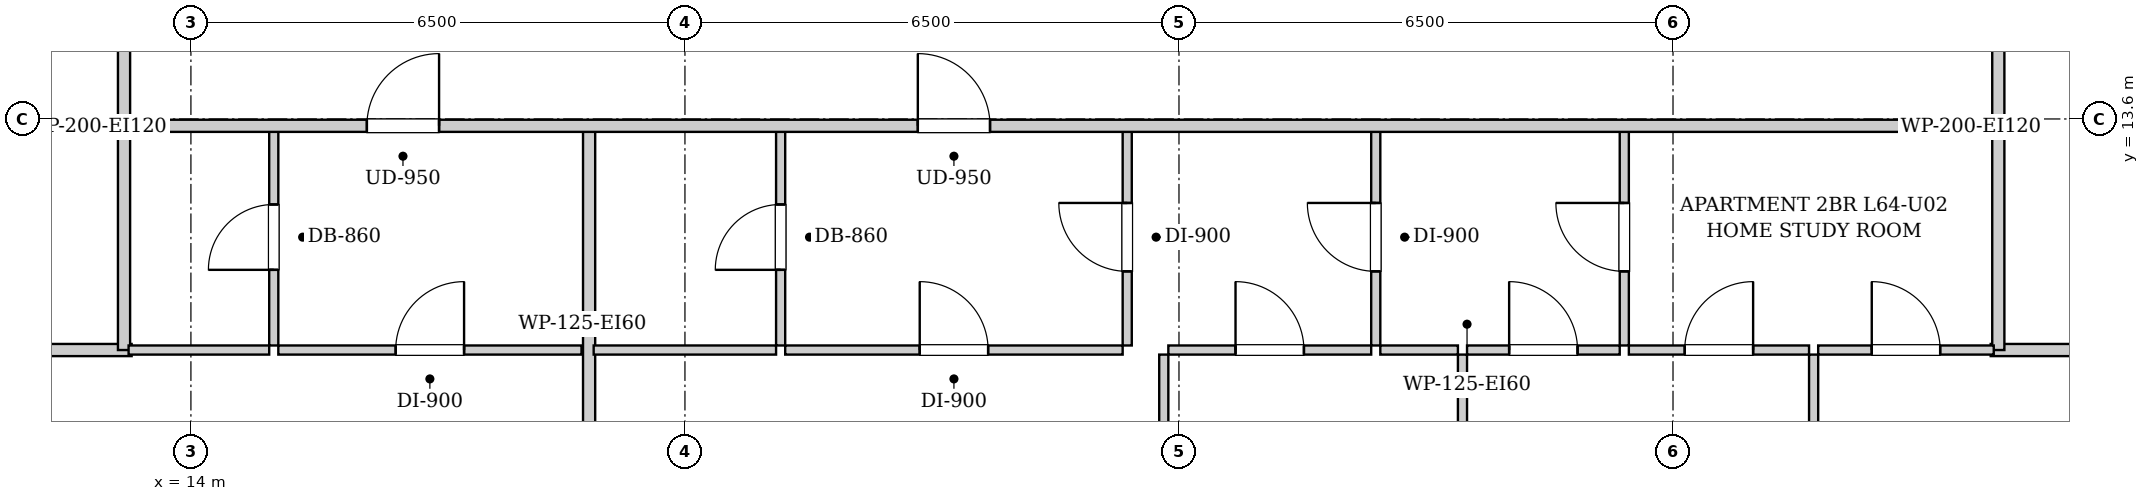
"""IFC4 building model, lengths in metres.
Left out: names, types, materials, properties, quantities, classifications, styles, units other than length and angle.
Written with IfcOpenShell. Run it as: python <this file> out.ifc"""

import sys

from ifc_helpers import new_model, si_unit, direction, frame, frame_2d, origin, place, context, subcontext, project, spatial, rectangle, extrude, element, fill, save


model = new_model("IFC4")
c1 = context("Model", 3, precision=1e-05, world=origin(), true_north=direction((0.0, 1.0)))
c2 = subcontext(c1, "Body", "Model", "MODEL_VIEW")
j1 = project(units=[si_unit("LENGTHUNIT", "METRE"), si_unit("PLANEANGLEUNIT", "RADIAN")], contexts=[c1])
p1 = place(None, origin())
s1 = spatial("IfcSite", under=j1, at=p1, CompositionType="ELEMENT")
p2 = place(p1, origin())
s2 = spatial("IfcBuilding", under=s1, at=p2, CompositionType="ELEMENT")
p3 = place(p2, frame((0.0, 0.0, 220.7)))
s3 = spatial("IfcBuildingStorey", under=s2, at=p3, CompositionType="ELEMENT", Elevation=220.7)
for number, where, z_axis, x_axis in (
    (1, (13.12, 13.51, 0.0), (0.0, 0.0, 1.0), (0.0, 1.0, 0.0)),
    (2, (37.78, 13.51, 0.0), (0.0, 0.0, 1.0), (0.0, 1.0, 0.0)),
):
    element("IfcWall", number, at=place(p3, frame(where, z_axis=z_axis, x_axis=x_axis)), inside=s3, PredefinedType="PARTITIONING", context=c2, shape_type="SweptSolid", body=[
        extrude(rectangle(XDim=1.58, YDim=0.16, at=frame_2d((0.79, 0.0))), origin(), (0.0, 0.0, 1.0), 3.14),
    ])
p4 = place(p3, frame((10.88, 10.56, 0.0), z_axis=(0.0, 0.0, 1.0), x_axis=(1.0, 0.0, 0.0)))
e3 = element("IfcWall", 3, at=p4, inside=s3, PredefinedType="PARTITIONING", context=c2, shape_type="SweptSolid", body=[
    extrude(rectangle(XDim=2.34, YDim=0.16, at=frame_2d((1.17, 0.0))), origin(), (0.0, 0.0, 1.0), 3.14),
])
p5 = place(p3, frame((13.12, 10.56, 0.0), z_axis=(0.0, 0.0, 1.0), x_axis=(0.0, 1.0, 0.0)))
e4 = element("IfcWall", 4, at=p5, inside=s3, PredefinedType="PARTITIONING", context=c2, shape_type="SweptSolid", body=[
    extrude(rectangle(XDim=2.91, YDim=0.16, at=frame_2d((1.455, 0.0))), origin(), (0.0, 0.0, 1.0), 3.14),
])
p6 = place(p3, frame((15.09, 10.62, 0.0), z_axis=(0.0, 0.0, 1.0), x_axis=(0.0, 1.0, 0.0)))
e5 = element("IfcWall", 5, at=p6, inside=s3, PredefinedType="PARTITIONING", context=c2, shape_type="SweptSolid", body=[
    extrude(rectangle(XDim=2.85, YDim=0.12, at=frame_2d((1.425, 0.0))), origin(), (0.0, 0.0, 1.0), 3.14),
])
p7 = place(p6, frame((0.995, 0.0, 0.0)))
e6 = element("IfcOpeningElement", 6, at=p7, cuts=e5, PredefinedType="OPENING", context=c2, shape_type="SweptSolid", body=[
    extrude(rectangle(XDim=0.86, YDim=2.05, at=frame_2d((0.43, 1.025))), frame((0.0, 0.07, 0.0), z_axis=(0.0, -1.0, 0.0), x_axis=(1.0, 0.0, 0.0)), (0.0, 0.0, 1.0), 0.14),
])
p8 = place(p3, frame((13.18, 10.56, 0.0), z_axis=(0.0, 0.0, 1.0), x_axis=(1.0, 0.0, 0.0)))
e7 = element("IfcWall", 7, at=p8, inside=s3, PredefinedType="PARTITIONING", context=c2, shape_type="SweptSolid", body=[
    extrude(rectangle(XDim=1.85, YDim=0.12, at=frame_2d((0.925, 0.0))), origin(), (0.0, 0.0, 1.0), 3.14),
])
p9 = place(p3, frame((15.15, 10.56, 0.0), z_axis=(0.0, 0.0, 1.0), x_axis=(1.0, 0.0, 0.0)))
e8 = element("IfcWall", 8, at=p9, inside=s3, PredefinedType="PARTITIONING", context=c2, shape_type="SweptSolid", body=[
    extrude(rectangle(XDim=3.989, YDim=0.12, at=frame_2d((1.995, 0.0))), origin(), (0.0, 0.0, 1.0), 3.14),
])
p10 = place(p9, frame((1.544, 0.0, 0.0)))
e9 = element("IfcOpeningElement", 9, at=p10, cuts=e8, PredefinedType="OPENING", context=c2, shape_type="SweptSolid", body=[
    extrude(rectangle(XDim=0.9, YDim=2.05, at=frame_2d((0.45, 1.025))), frame((0.0, 0.07, 0.0), z_axis=(0.0, -1.0, 0.0), x_axis=(1.0, 0.0, 0.0)), (0.0, 0.0, 1.0), 0.14),
])
p11 = place(p3, frame((37.68, 10.56, 0.0), z_axis=(0.0, 0.0, 1.0), x_axis=(1.0, 0.0, 0.0)))
e10 = element("IfcWall", 10, at=p11, inside=s3, PredefinedType="PARTITIONING", context=c2, shape_type="SweptSolid", body=[
    extrude(rectangle(XDim=2.34, YDim=0.16, at=frame_2d((1.17, 0.0))), origin(), (0.0, 0.0, 1.0), 3.14),
])
p12 = place(p3, frame((37.78, 10.56, 0.0), z_axis=(0.0, 0.0, 1.0), x_axis=(0.0, 1.0, 0.0)))
e11 = element("IfcWall", 11, at=p12, inside=s3, PredefinedType="PARTITIONING", context=c2, shape_type="SweptSolid", body=[
    extrude(rectangle(XDim=2.91, YDim=0.16, at=frame_2d((1.455, 0.0))), origin(), (0.0, 0.0, 1.0), 3.14),
])
p13 = place(p3, frame((19.239, 6.06, 0.0), z_axis=(0.0, 0.0, 1.0), x_axis=(0.0, 1.0, 0.0)))
e12 = element("IfcWall", 12, at=p13, inside=s3, PredefinedType="PARTITIONING", context=c2, shape_type="SweptSolid", body=[
    extrude(rectangle(XDim=7.41, YDim=0.16, at=frame_2d((3.705, 0.0))), origin(), (0.0, 0.0, 1.0), 3.14),
])
p14 = place(p3, frame((21.759, 10.62, 0.0), z_axis=(0.0, 0.0, 1.0), x_axis=(0.0, 1.0, 0.0)))
e13 = element("IfcWall", 13, at=p14, inside=s3, PredefinedType="PARTITIONING", context=c2, shape_type="SweptSolid", body=[
    extrude(rectangle(XDim=2.85, YDim=0.12, at=frame_2d((1.425, 0.0))), origin(), (0.0, 0.0, 1.0), 3.14),
])
p15 = place(p14, frame((0.995, 0.0, 0.0)))
e14 = element("IfcOpeningElement", 14, at=p15, cuts=e13, PredefinedType="OPENING", context=c2, shape_type="SweptSolid", body=[
    extrude(rectangle(XDim=0.86, YDim=2.05, at=frame_2d((0.43, 1.025))), frame((0.0, 0.07, 0.0), z_axis=(0.0, -1.0, 0.0), x_axis=(1.0, 0.0, 0.0)), (0.0, 0.0, 1.0), 0.14),
])
p16 = place(p3, frame((19.299, 10.56, 0.0), z_axis=(0.0, 0.0, 1.0), x_axis=(1.0, 0.0, 0.0)))
e15 = element("IfcWall", 15, at=p16, inside=s3, PredefinedType="PARTITIONING", context=c2, shape_type="SweptSolid", body=[
    extrude(rectangle(XDim=2.4, YDim=0.12, at=frame_2d((1.2, 0.0))), origin(), (0.0, 0.0, 1.0), 3.14),
])
p17 = place(p3, frame((26.319, 10.62, 0.0), z_axis=(0.0, 0.0, 1.0), x_axis=(0.0, 1.0, 0.0)))
e16 = element("IfcWall", 16, at=p17, inside=s3, PredefinedType="PARTITIONING", context=c2, shape_type="SweptSolid", body=[
    extrude(rectangle(XDim=2.85, YDim=0.12, at=frame_2d((1.425, 0.0))), origin(), (0.0, 0.0, 1.0), 3.14),
])
p18 = place(p17, frame((0.975, 0.0, 0.0)))
e17 = element("IfcOpeningElement", 17, at=p18, cuts=e16, PredefinedType="OPENING", context=c2, shape_type="SweptSolid", body=[
    extrude(rectangle(XDim=0.9, YDim=2.05, at=frame_2d((0.45, 1.025))), frame((0.0, 0.07, 0.0), z_axis=(0.0, -1.0, 0.0), x_axis=(1.0, 0.0, 0.0)), (0.0, 0.0, 1.0), 0.14),
])
p19 = place(p3, frame((21.819, 10.56, 0.0), z_axis=(0.0, 0.0, 1.0), x_axis=(1.0, 0.0, 0.0)))
e18 = element("IfcWall", 18, at=p19, inside=s3, PredefinedType="PARTITIONING", context=c2, shape_type="SweptSolid", body=[
    extrude(rectangle(XDim=4.44, YDim=0.12, at=frame_2d((2.22, 0.0))), origin(), (0.0, 0.0, 1.0), 3.14),
])
p20 = place(p19, frame((1.77, 0.0, 0.0)))
e19 = element("IfcOpeningElement", 19, at=p20, cuts=e18, PredefinedType="OPENING", context=c2, shape_type="SweptSolid", body=[
    extrude(rectangle(XDim=0.9, YDim=2.05, at=frame_2d((0.45, 1.025))), frame((0.0, 0.07, 0.0), z_axis=(0.0, -1.0, 0.0), x_axis=(1.0, 0.0, 0.0)), (0.0, 0.0, 1.0), 0.14),
])
p21 = place(p3, frame((29.589, 10.62, 0.0), z_axis=(0.0, 0.0, 1.0), x_axis=(0.0, 1.0, 0.0)))
e20 = element("IfcWall", 20, at=p21, inside=s3, PredefinedType="PARTITIONING", context=c2, shape_type="SweptSolid", body=[
    extrude(rectangle(XDim=2.85, YDim=0.12, at=frame_2d((1.425, 0.0))), origin(), (0.0, 0.0, 1.0), 3.14),
])
p22 = place(p21, frame((0.975, 0.0, 0.0)))
e21 = element("IfcOpeningElement", 21, at=p22, cuts=e20, PredefinedType="OPENING", context=c2, shape_type="SweptSolid", body=[
    extrude(rectangle(XDim=0.9, YDim=2.05, at=frame_2d((0.45, 1.025))), frame((0.0, 0.07, 0.0), z_axis=(0.0, -1.0, 0.0), x_axis=(1.0, 0.0, 0.0)), (0.0, 0.0, 1.0), 0.14),
])
p23 = place(p3, frame((26.86, 10.56, 0.0), z_axis=(0.0, 0.0, 1.0), x_axis=(1.0, 0.0, 0.0)))
e22 = element("IfcWall", 22, at=p23, inside=s3, PredefinedType="PARTITIONING", context=c2, shape_type="SweptSolid", body=[
    extrude(rectangle(XDim=2.669, YDim=0.12, at=frame_2d((1.334, 0.0))), origin(), (0.0, 0.0, 1.0), 3.14),
])
p24 = place(p23, frame((0.884, 0.0, 0.0)))
e23 = element("IfcOpeningElement", 23, at=p24, cuts=e22, PredefinedType="OPENING", context=c2, shape_type="SweptSolid", body=[
    extrude(rectangle(XDim=0.9, YDim=2.05, at=frame_2d((0.45, 1.025))), frame((0.0, 0.07, 0.0), z_axis=(0.0, -1.0, 0.0), x_axis=(1.0, 0.0, 0.0)), (0.0, 0.0, 1.0), 0.14),
])
p25 = place(p3, frame((32.859, 10.62, 0.0), z_axis=(0.0, 0.0, 1.0), x_axis=(0.0, 1.0, 0.0)))
e24 = element("IfcWall", 24, at=p25, inside=s3, PredefinedType="PARTITIONING", context=c2, shape_type="SweptSolid", body=[
    extrude(rectangle(XDim=2.85, YDim=0.12, at=frame_2d((1.425, 0.0))), origin(), (0.0, 0.0, 1.0), 3.14),
])
p26 = place(p25, frame((0.975, 0.0, 0.0)))
e25 = element("IfcOpeningElement", 25, at=p26, cuts=e24, PredefinedType="OPENING", context=c2, shape_type="SweptSolid", body=[
    extrude(rectangle(XDim=0.9, YDim=2.05, at=frame_2d((0.45, 1.025))), frame((0.0, 0.07, 0.0), z_axis=(0.0, -1.0, 0.0), x_axis=(1.0, 0.0, 0.0)), (0.0, 0.0, 1.0), 0.14),
])
p27 = place(p3, frame((29.649, 10.56, 0.0), z_axis=(0.0, 0.0, 1.0), x_axis=(1.0, 0.0, 0.0)))
e26 = element("IfcWall", 26, at=p27, inside=s3, PredefinedType="PARTITIONING", context=c2, shape_type="SweptSolid", body=[
    extrude(rectangle(XDim=1.021, YDim=0.12, at=frame_2d((0.51, 0.0))), origin(), (0.0, 0.0, 1.0), 3.14),
])
p28 = place(p3, frame((30.79, 10.56, 0.0), z_axis=(0.0, 0.0, 1.0), x_axis=(1.0, 0.0, 0.0)))
e27 = element("IfcWall", 27, at=p28, inside=s3, PredefinedType="PARTITIONING", context=c2, shape_type="SweptSolid", body=[
    extrude(rectangle(XDim=2.009, YDim=0.12, at=frame_2d((1.004, 0.0))), origin(), (0.0, 0.0, 1.0), 3.14),
])
p29 = place(p28, frame((0.554, 0.0, 0.0)))
e28 = element("IfcOpeningElement", 28, at=p29, cuts=e27, PredefinedType="OPENING", context=c2, shape_type="SweptSolid", body=[
    extrude(rectangle(XDim=0.9, YDim=2.05, at=frame_2d((0.45, 1.025))), frame((0.0, 0.07, 0.0), z_axis=(0.0, -1.0, 0.0), x_axis=(1.0, 0.0, 0.0)), (0.0, 0.0, 1.0), 0.14),
])
p30 = place(p3, frame((32.919, 10.56, 0.0), z_axis=(0.0, 0.0, 1.0), x_axis=(1.0, 0.0, 0.0)))
e29 = element("IfcWall", 29, at=p30, inside=s3, PredefinedType="PARTITIONING", context=c2, shape_type="SweptSolid", body=[
    extrude(rectangle(XDim=2.371, YDim=0.12, at=frame_2d((1.186, 0.0))), origin(), (0.0, 0.0, 1.0), 3.14),
])
p31 = place(p30, frame((0.735, 0.0, 0.0)))
e30 = element("IfcOpeningElement", 30, at=p31, cuts=e29, PredefinedType="OPENING", context=c2, shape_type="SweptSolid", body=[
    extrude(rectangle(XDim=0.9, YDim=2.05, at=frame_2d((0.45, 1.025))), frame((0.0, 0.07, 0.0), z_axis=(0.0, -1.0, 0.0), x_axis=(1.0, 0.0, 0.0)), (0.0, 0.0, 1.0), 0.14),
])
p32 = place(p3, frame((35.41, 10.56, 0.0), z_axis=(0.0, 0.0, 1.0), x_axis=(1.0, 0.0, 0.0)))
e31 = element("IfcWall", 31, at=p32, inside=s3, PredefinedType="PARTITIONING", context=c2, shape_type="SweptSolid", body=[
    extrude(rectangle(XDim=2.31, YDim=0.12, at=frame_2d((1.155, 0.0))), origin(), (0.0, 0.0, 1.0), 3.14),
])
p33 = place(p32, frame((0.705, 0.0, 0.0)))
e32 = element("IfcOpeningElement", 32, at=p33, cuts=e31, PredefinedType="OPENING", context=c2, shape_type="SweptSolid", body=[
    extrude(rectangle(XDim=0.9, YDim=2.05, at=frame_2d((0.45, 1.025))), frame((0.0, 0.07, 0.0), z_axis=(0.0, -1.0, 0.0), x_axis=(1.0, 0.0, 0.0)), (0.0, 0.0, 1.0), 0.14),
])
p34 = place(p3, frame((26.8, 4.08, 0.0), z_axis=(0.0, 0.0, 1.0), x_axis=(0.0, 1.0, 0.0)))
e33 = element("IfcWall", 33, at=p34, inside=s3, PredefinedType="PARTITIONING", context=c2, shape_type="SweptSolid", body=[
    extrude(rectangle(XDim=6.42, YDim=0.12, at=frame_2d((3.21, 0.0))), origin(), (0.0, 0.0, 1.0), 3.14),
])
p35 = place(p34, frame((2.745, 0.0, 0.0)))
e34 = element("IfcOpeningElement", 34, at=p35, cuts=e33, PredefinedType="OPENING", context=c2, shape_type="SweptSolid", body=[
    extrude(rectangle(XDim=0.9, YDim=2.05, at=frame_2d((0.45, 1.025))), frame((0.0, 0.07, 0.0), z_axis=(0.0, -1.0, 0.0), x_axis=(1.0, 0.0, 0.0)), (0.0, 0.0, 1.0), 0.14),
])
p36 = place(p3, frame((30.73, 4.08, 0.0), z_axis=(0.0, 0.0, 1.0), x_axis=(0.0, 1.0, 0.0)))
e35 = element("IfcWall", 35, at=p36, inside=s3, PredefinedType="PARTITIONING", context=c2, shape_type="SweptSolid", body=[
    extrude(rectangle(XDim=6.42, YDim=0.12, at=frame_2d((3.21, 0.0))), origin(), (0.0, 0.0, 1.0), 3.14),
])
p37 = place(p36, frame((2.745, 0.0, 0.0)))
e36 = element("IfcOpeningElement", 36, at=p37, cuts=e35, PredefinedType="OPENING", context=c2, shape_type="SweptSolid", body=[
    extrude(rectangle(XDim=0.9, YDim=2.05, at=frame_2d((0.45, 1.025))), frame((0.0, 0.07, 0.0), z_axis=(0.0, -1.0, 0.0), x_axis=(1.0, 0.0, 0.0)), (0.0, 0.0, 1.0), 0.14),
])
p38 = place(p3, frame((35.35, 4.08, 0.0), z_axis=(0.0, 0.0, 1.0), x_axis=(0.0, 1.0, 0.0)))
e37 = element("IfcWall", 37, at=p38, inside=s3, PredefinedType="PARTITIONING", context=c2, shape_type="SweptSolid", body=[
    extrude(rectangle(XDim=6.42, YDim=0.12, at=frame_2d((3.21, 0.0))), origin(), (0.0, 0.0, 1.0), 3.14),
])
p39 = place(p38, frame((2.745, 0.0, 0.0)))
e38 = element("IfcOpeningElement", 38, at=p39, cuts=e37, PredefinedType="OPENING", context=c2, shape_type="SweptSolid", body=[
    extrude(rectangle(XDim=0.9, YDim=2.05, at=frame_2d((0.45, 1.025))), frame((0.0, 0.07, 0.0), z_axis=(0.0, -1.0, 0.0), x_axis=(1.0, 0.0, 0.0)), (0.0, 0.0, 1.0), 0.14),
])
p40 = place(p3, frame((13.15, 13.51, 0.0), z_axis=(0.0, 0.0, 1.0), x_axis=(1.0, 0.0, 0.0)))
e39 = element("IfcWall", 39, at=p40, inside=s3, PredefinedType="PARTITIONING", context=c2, shape_type="SweptSolid", body=[
    extrude(rectangle(XDim=24.6, YDim=0.16, at=frame_2d((12.3, 0.0))), origin(), (0.0, 0.0, 1.0), 3.14),
])
p41 = place(p40, frame((3.165, 0.0, 0.0)))
e40 = element("IfcOpeningElement", 40, at=p41, cuts=e39, PredefinedType="OPENING", context=c2, shape_type="SweptSolid", body=[
    extrude(rectangle(XDim=0.95, YDim=2.1, at=frame_2d((0.475, 1.05))), frame((0.0, 0.09, 0.0), z_axis=(0.0, -1.0, 0.0), x_axis=(1.0, 0.0, 0.0)), (0.0, 0.0, 1.0), 0.18),
])
p42 = place(p40, frame((10.414, 0.0, 0.0)))
e41 = element("IfcOpeningElement", 41, at=p42, cuts=e39, PredefinedType="OPENING", context=c2, shape_type="SweptSolid", body=[
    extrude(rectangle(XDim=0.95, YDim=2.1, at=frame_2d((0.475, 1.05))), frame((0.0, 0.09, 0.0), z_axis=(0.0, -1.0, 0.0), x_axis=(1.0, 0.0, 0.0)), (0.0, 0.0, 1.0), 0.18),
])
p43 = place(p7, origin())
e42 = element("IfcDoor", 42, at=p43, inside=s3, OperationType="SINGLE_SWING_LEFT", PredefinedType="DOOR", context=c2, shape_type="SweptSolid", body=[
    extrude(rectangle(XDim=0.86, YDim=2.05, at=frame_2d((0.43, 1.025))), frame((0.0, 0.025, 0.0), z_axis=(0.0, -1.0, 0.0), x_axis=(1.0, 0.0, 0.0)), (0.0, 0.0, 1.0), 0.05),
])
fill(e6, e42)
p44 = place(p10, origin())
e43 = element("IfcDoor", 43, at=p44, inside=s3, OperationType="SINGLE_SWING_RIGHT", PredefinedType="DOOR", context=c2, shape_type="SweptSolid", body=[
    extrude(rectangle(XDim=0.9, YDim=2.05, at=frame_2d((0.45, 1.025))), frame((0.0, 0.025, 0.0), z_axis=(0.0, -1.0, 0.0), x_axis=(1.0, 0.0, 0.0)), (0.0, 0.0, 1.0), 0.05),
])
fill(e9, e43)
p45 = place(p15, origin())
e44 = element("IfcDoor", 44, at=p45, inside=s3, OperationType="SINGLE_SWING_LEFT", PredefinedType="DOOR", context=c2, shape_type="SweptSolid", body=[
    extrude(rectangle(XDim=0.86, YDim=2.05, at=frame_2d((0.43, 1.025))), frame((0.0, 0.025, 0.0), z_axis=(0.0, -1.0, 0.0), x_axis=(1.0, 0.0, 0.0)), (0.0, 0.0, 1.0), 0.05),
])
fill(e14, e44)
p46 = place(p18, origin())
e45 = element("IfcDoor", 45, at=p46, inside=s3, OperationType="SINGLE_SWING_RIGHT", PredefinedType="DOOR", context=c2, shape_type="SweptSolid", body=[
    extrude(rectangle(XDim=0.9, YDim=2.05, at=frame_2d((0.45, 1.025))), frame((0.0, 0.025, 0.0), z_axis=(0.0, -1.0, 0.0), x_axis=(1.0, 0.0, 0.0)), (0.0, 0.0, 1.0), 0.05),
])
fill(e17, e45)
p47 = place(p20, origin())
e46 = element("IfcDoor", 46, at=p47, inside=s3, OperationType="SINGLE_SWING_LEFT", PredefinedType="DOOR", context=c2, shape_type="SweptSolid", body=[
    extrude(rectangle(XDim=0.9, YDim=2.05, at=frame_2d((0.45, 1.025))), frame((0.0, 0.025, 0.0), z_axis=(0.0, -1.0, 0.0), x_axis=(1.0, 0.0, 0.0)), (0.0, 0.0, 1.0), 0.05),
])
fill(e19, e46)
p48 = place(p22, origin())
e47 = element("IfcDoor", 47, at=p48, inside=s3, OperationType="SINGLE_SWING_RIGHT", PredefinedType="DOOR", context=c2, shape_type="SweptSolid", body=[
    extrude(rectangle(XDim=0.9, YDim=2.05, at=frame_2d((0.45, 1.025))), frame((0.0, 0.025, 0.0), z_axis=(0.0, -1.0, 0.0), x_axis=(1.0, 0.0, 0.0)), (0.0, 0.0, 1.0), 0.05),
])
fill(e21, e47)
p49 = place(p24, origin())
e48 = element("IfcDoor", 48, at=p49, inside=s3, OperationType="SINGLE_SWING_LEFT", PredefinedType="DOOR", context=c2, shape_type="SweptSolid", body=[
    extrude(rectangle(XDim=0.9, YDim=2.05, at=frame_2d((0.45, 1.025))), frame((0.0, 0.025, 0.0), z_axis=(0.0, -1.0, 0.0), x_axis=(1.0, 0.0, 0.0)), (0.0, 0.0, 1.0), 0.05),
])
fill(e23, e48)
p50 = place(p26, origin())
e49 = element("IfcDoor", 49, at=p50, inside=s3, OperationType="SINGLE_SWING_RIGHT", PredefinedType="DOOR", context=c2, shape_type="SweptSolid", body=[
    extrude(rectangle(XDim=0.9, YDim=2.05, at=frame_2d((0.45, 1.025))), frame((0.0, 0.025, 0.0), z_axis=(0.0, -1.0, 0.0), x_axis=(1.0, 0.0, 0.0)), (0.0, 0.0, 1.0), 0.05),
])
fill(e25, e49)
p51 = place(p29, origin())
e50 = element("IfcDoor", 50, at=p51, inside=s3, OperationType="SINGLE_SWING_LEFT", PredefinedType="DOOR", context=c2, shape_type="SweptSolid", body=[
    extrude(rectangle(XDim=0.9, YDim=2.05, at=frame_2d((0.45, 1.025))), frame((0.0, 0.025, 0.0), z_axis=(0.0, -1.0, 0.0), x_axis=(1.0, 0.0, 0.0)), (0.0, 0.0, 1.0), 0.05),
])
fill(e28, e50)
p52 = place(p31, origin())
e51 = element("IfcDoor", 51, at=p52, inside=s3, OperationType="SINGLE_SWING_RIGHT", PredefinedType="DOOR", context=c2, shape_type="SweptSolid", body=[
    extrude(rectangle(XDim=0.9, YDim=2.05, at=frame_2d((0.45, 1.025))), frame((0.0, 0.025, 0.0), z_axis=(0.0, -1.0, 0.0), x_axis=(1.0, 0.0, 0.0)), (0.0, 0.0, 1.0), 0.05),
])
fill(e30, e51)
p53 = place(p33, origin())
e52 = element("IfcDoor", 52, at=p53, inside=s3, OperationType="SINGLE_SWING_LEFT", PredefinedType="DOOR", context=c2, shape_type="SweptSolid", body=[
    extrude(rectangle(XDim=0.9, YDim=2.05, at=frame_2d((0.45, 1.025))), frame((0.0, 0.025, 0.0), z_axis=(0.0, -1.0, 0.0), x_axis=(1.0, 0.0, 0.0)), (0.0, 0.0, 1.0), 0.05),
])
fill(e32, e52)
p54 = place(p41, origin())
e53 = element("IfcDoor", 53, at=p54, inside=s3, OperationType="SINGLE_SWING_RIGHT", PredefinedType="DOOR", context=c2, shape_type="SweptSolid", body=[
    extrude(rectangle(XDim=0.95, YDim=2.1, at=frame_2d((0.475, 1.05))), frame((0.0, 0.025, 0.0), z_axis=(0.0, -1.0, 0.0), x_axis=(1.0, 0.0, 0.0)), (0.0, 0.0, 1.0), 0.05),
])
fill(e40, e53)
p55 = place(p42, origin())
e54 = element("IfcDoor", 54, at=p55, inside=s3, OperationType="SINGLE_SWING_LEFT", PredefinedType="DOOR", context=c2, shape_type="SweptSolid", body=[
    extrude(rectangle(XDim=0.95, YDim=2.1, at=frame_2d((0.475, 1.05))), frame((0.0, 0.025, 0.0), z_axis=(0.0, -1.0, 0.0), x_axis=(1.0, 0.0, 0.0)), (0.0, 0.0, 1.0), 0.05),
])
fill(e41, e54)
save(model, sys.argv[1])
